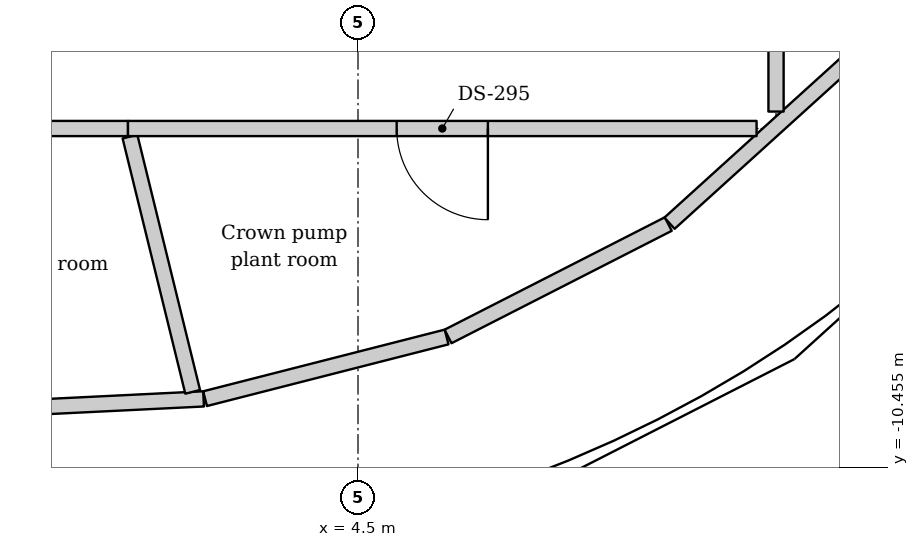
"""IFC4 building model, lengths in metres.
Left out: names, types, materials, properties, quantities, classifications, styles, units other than length and angle.
Written with IfcOpenShell. Run it as: python <this file> out.ifc"""

import sys

from ifc_helpers import new_model, si_unit, direction, frame, frame_2d, origin, place, context, subcontext, project, spatial, rectangle, extrude, source, transform, mapped, element, fill, save


model = new_model("IFC4")
c1 = context("Model", 3, precision=1e-05, world=origin(), true_north=direction((0.0, 1.0)))
c2 = subcontext(c1, "Body", "Model", "MODEL_VIEW")
j1 = project(units=[si_unit("LENGTHUNIT", "METRE"), si_unit("PLANEANGLEUNIT", "RADIAN")], contexts=[c1])
p1 = place(None, origin())
s1 = spatial("IfcSite", under=j1, at=p1, CompositionType="ELEMENT")
p2 = place(p1, origin())
s2 = spatial("IfcBuilding", under=s1, at=p2, CompositionType="ELEMENT")
p3 = place(p2, frame((0.0, 0.0, 365.5)))
s3 = spatial("IfcBuildingStorey", under=s2, at=p3, CompositionType="ELEMENT", Elevation=365.5)
m1 = source(origin(), c2, "Body", "SweptSolid", [
    extrude(rectangle(XDim=3.292, YDim=0.2, at=frame_2d((1.646, 0.0))), origin(), (0.0, 0.0, 1.0), 4.25),
])
p4 = place(p3, frame((2.468, -9.558, 0.0), z_axis=(0.0, 0.0, 1.0), x_axis=(-0.998797426177, -0.049027558199, 0.0)))
e1 = element("IfcWall", 1, at=p4, inside=s3, PredefinedType="SOLIDWALL", context=c2, shape_type="MappedRepresentation", body=[
    mapped(m1, transform((0.0, 0.0, 0.0))),
])
m2 = source(origin(), c2, "Body", "SweptSolid", [
    extrude(rectangle(XDim=3.28, YDim=0.2, at=frame_2d((1.64, 0.0))), origin(), (0.0, 0.0, 1.0), 4.25),
])
p5 = place(p3, frame((5.666, -8.743, 0.0), z_axis=(0.0, 0.0, 1.0), x_axis=(-0.968908599462, -0.247418927911, 0.0)))
e2 = element("IfcWall", 2, at=p5, inside=s3, PredefinedType="SOLIDWALL", context=c2, shape_type="MappedRepresentation", body=[
    mapped(m2, transform((0.0, 0.0, 0.0))),
])
m3 = source(origin(), c2, "Body", "SweptSolid", [
    extrude(rectangle(XDim=3.253, YDim=0.2, at=frame_2d((1.627, 0.0))), origin(), (0.0, 0.0, 1.0), 4.25),
])
p6 = place(p3, frame((8.582, -7.257, 0.0), z_axis=(0.0, 0.0, 1.0), x_axis=(-0.89068931978, -0.45461251152, 0.0)))
e3 = element("IfcWall", 3, at=p6, inside=s3, PredefinedType="SOLIDWALL", context=c2, shape_type="MappedRepresentation", body=[
    mapped(m3, transform((0.0, 0.0, 0.0))),
])
m4 = source(origin(), c2, "Body", "SweptSolid", [
    extrude(rectangle(XDim=3.205, YDim=0.2, at=frame_2d((1.603, 0.0))), origin(), (0.0, 0.0, 1.0), 4.25),
])
p7 = place(p3, frame((10.974, -5.094, 0.0), z_axis=(0.0, 0.0, 1.0), x_axis=(-0.741131432131, -0.671359963289, 0.0)))
e4 = element("IfcWall", 4, at=p7, inside=s3, PredefinedType="SOLIDWALL", context=c2, shape_type="MappedRepresentation", body=[
    mapped(m4, transform((0.0, 0.0, 0.0))),
])
m5 = source(origin(), c2, "Body", "SweptSolid", [
    extrude(rectangle(XDim=11.365, YDim=0.2, at=frame_2d((5.683, 0.0))), origin(), (0.0, 0.0, 1.0), 4.25),
])
p8 = place(p3, frame((1.474, -6.0, 0.0), z_axis=(0.0, 0.0, 1.0), x_axis=(-1.0, 0.0, 0.0)))
e5 = element("IfcWall", 5, at=p8, inside=s3, PredefinedType="PARTITIONING", context=c2, shape_type="MappedRepresentation", body=[
    mapped(m5, transform((0.0, 0.0, 0.0))),
])
m6 = source(origin(), c2, "Body", "SweptSolid", [
    extrude(rectangle(XDim=1.2, YDim=2.1, at=frame_2d((0.6, 1.05))), frame((0.0, 0.11, 0.0), z_axis=(0.0, -1.0, 0.0), x_axis=(1.0, 0.0, 0.0)), (0.0, 0.0, 1.0), 0.22),
])
p9 = place(p8, frame((5.082, 0.0, 0.0)))
e6 = element("IfcOpeningElement", 6, at=p9, cuts=e5, PredefinedType="OPENING", context=c2, shape_type="MappedRepresentation", body=[
    mapped(m6, transform((0.0, 0.0, 0.0))),
])
m7 = source(origin(), c2, "Body", "SweptSolid", [
    extrude(rectangle(XDim=3.458, YDim=0.2, at=frame_2d((1.729, 0.0))), origin(), (0.0, 0.0, 1.0), 4.25),
])
p10 = place(p3, frame((1.5, -6.107, 0.0), z_axis=(0.0, 0.0, 1.0), x_axis=(0.238563284271, -0.971126953286, 0.0)))
e7 = element("IfcWall", 7, at=p10, inside=s3, PredefinedType="PARTITIONING", context=c2, shape_type="MappedRepresentation", body=[
    mapped(m7, transform((0.0, 0.0, 0.0))),
])
m8 = source(origin(), c2, "Body", "SweptSolid", [
    extrude(rectangle(XDim=8.27, YDim=0.2, at=frame_2d((4.135, 0.0))), origin(), (0.0, 0.0, 1.0), 4.25),
])
p11 = place(p3, frame((9.744, -6.0, 0.0), z_axis=(0.0, 0.0, 1.0), x_axis=(-1.0, 0.0, 0.0)))
e8 = element("IfcWall", 8, at=p11, inside=s3, PredefinedType="PARTITIONING", context=c2, shape_type="MappedRepresentation", body=[
    mapped(m8, transform((0.0, 0.0, 0.0))),
])
p12 = place(p11, frame((3.535, 0.0, 0.0)))
e9 = element("IfcOpeningElement", 9, at=p12, cuts=e8, PredefinedType="OPENING", context=c2, shape_type="MappedRepresentation", body=[
    mapped(m6, transform((0.0, 0.0, 0.0))),
])
m9 = source(origin(), c2, "Body", "SweptSolid", [
    extrude(rectangle(XDim=7.759, YDim=0.2, at=frame_2d((3.879, 0.0))), origin(), (0.0, 0.0, 1.0), 4.25),
])
p13 = place(p3, frame((10.0, 1.982, 0.0), z_axis=(0.0, 0.0, 1.0), x_axis=(0.0, -1.0, 0.0)))
e10 = element("IfcWall", 10, at=p13, inside=s3, PredefinedType="PARTITIONING", context=c2, shape_type="MappedRepresentation", body=[
    mapped(m9, transform((0.0, 0.0, 0.0))),
])
p14 = place(p13, frame((3.28, 0.0, 0.0)))
e11 = element("IfcOpeningElement", 11, at=p14, cuts=e10, PredefinedType="OPENING", context=c2, shape_type="MappedRepresentation", body=[
    mapped(m6, transform((0.0, 0.0, 0.0))),
])
m10 = source(origin(), c2, "Body", "SweptSolid", [
    extrude(rectangle(XDim=1.2, YDim=2.1, at=frame_2d((0.6, 1.05))), frame((0.0, 0.025, 0.0), z_axis=(0.0, -1.0, 0.0), x_axis=(1.0, 0.0, 0.0)), (0.0, 0.0, 1.0), 0.05),
])
p15 = place(p12, origin())
e12 = element("IfcDoor", 12, at=p15, inside=s3, OperationType="SINGLE_SWING_LEFT", PredefinedType="DOOR", context=c2, shape_type="MappedRepresentation", body=[
    mapped(m10, transform((0.0, 0.0, 0.0))),
])
fill(e9, e12)
save(model, sys.argv[1])
